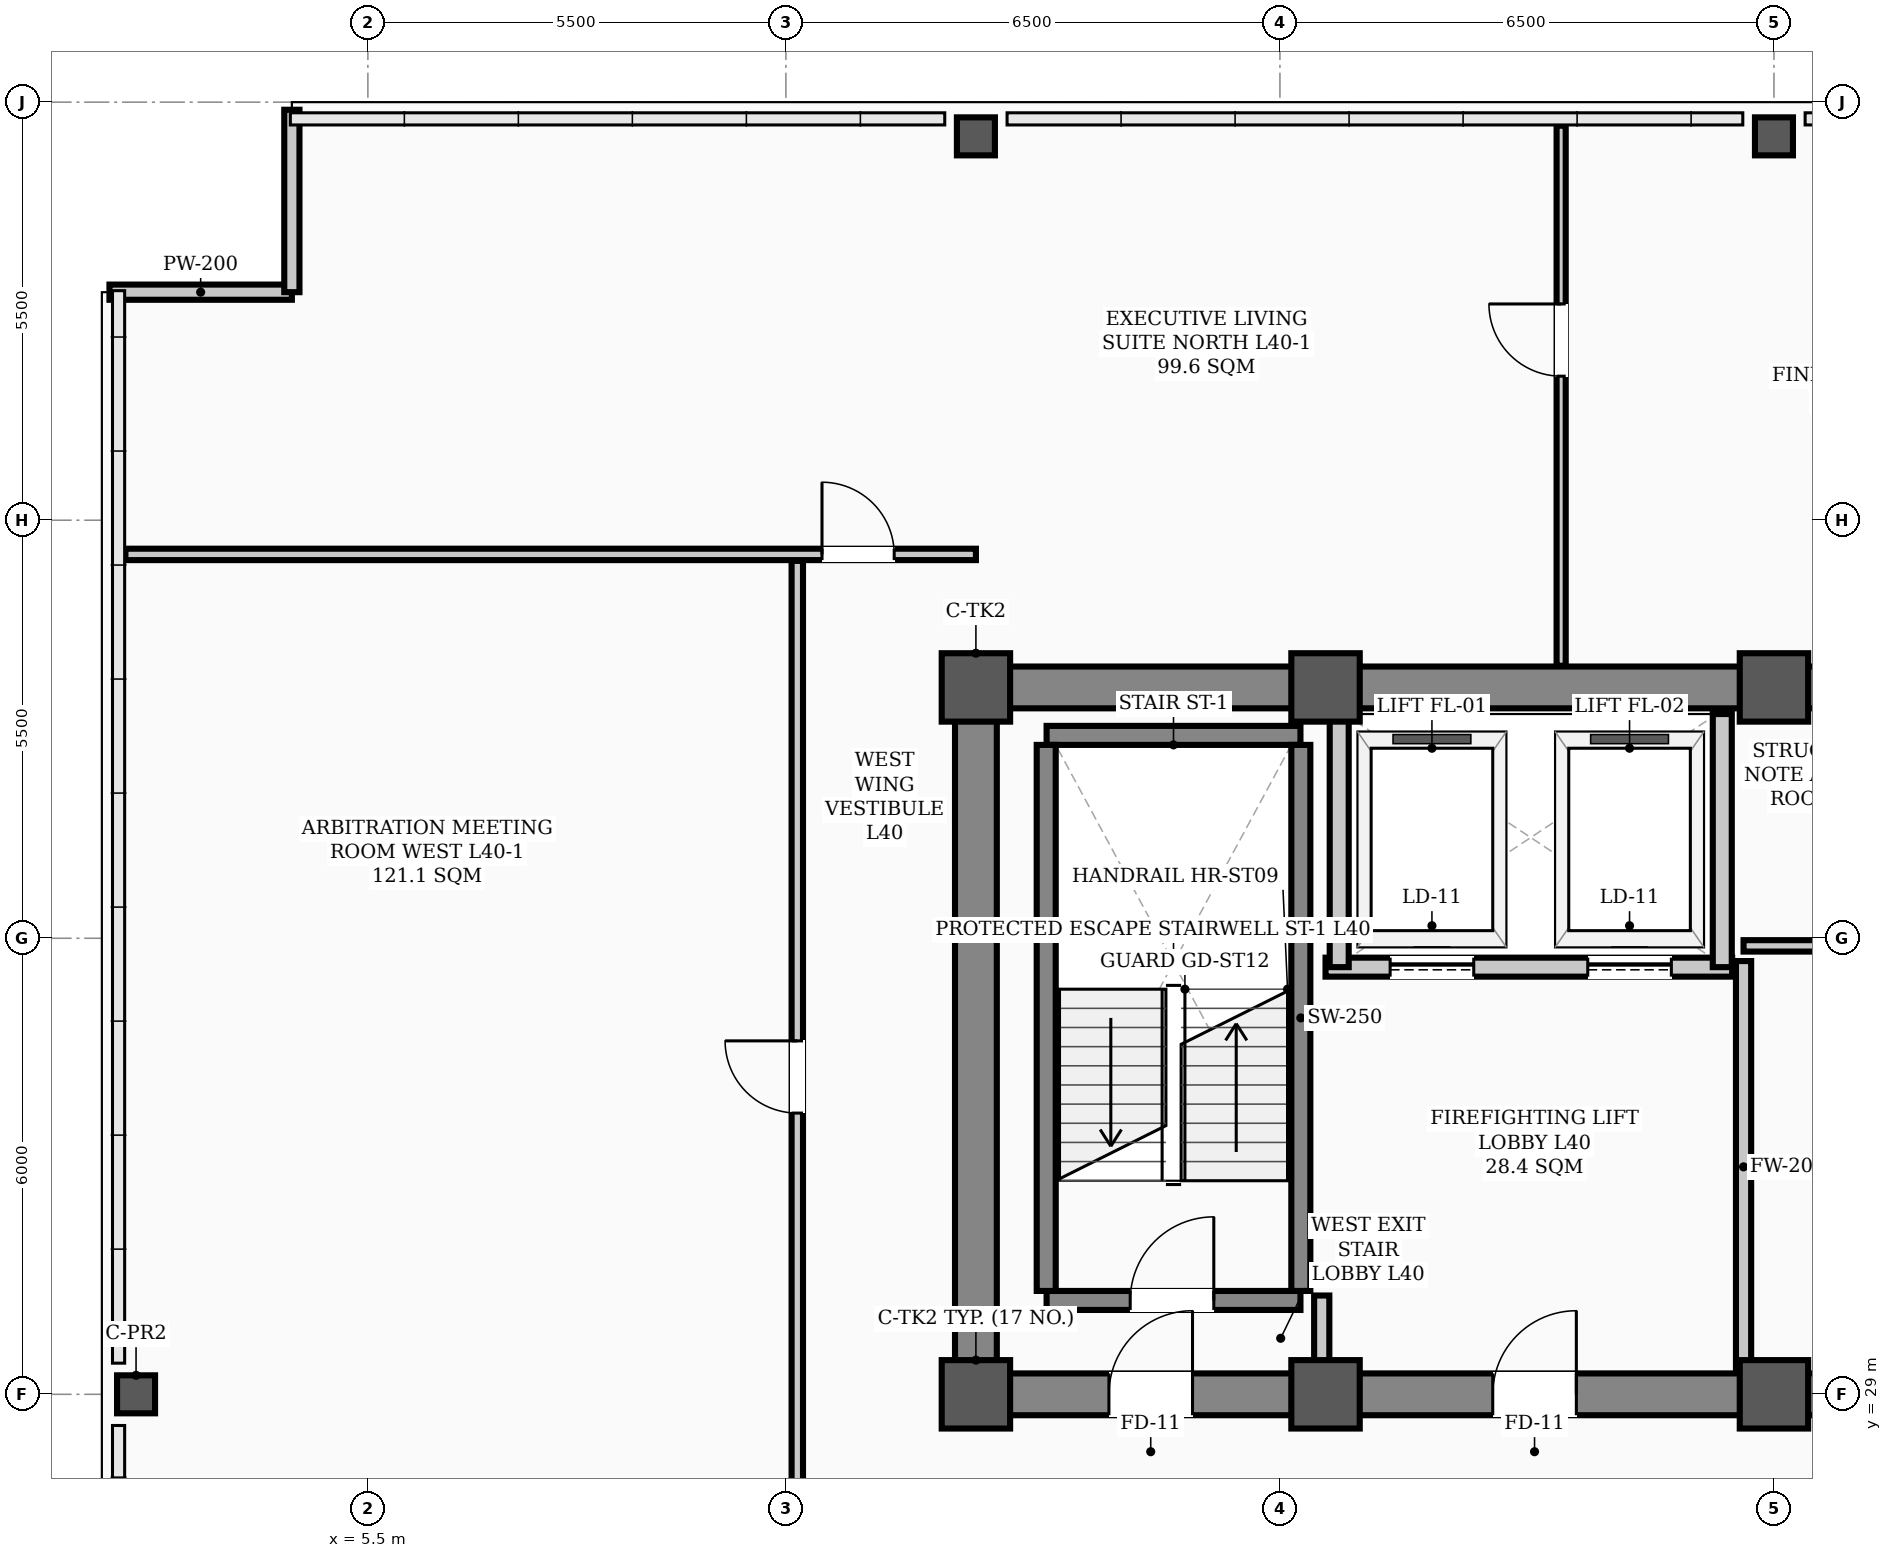
"""IFC4 building model, lengths in metres.
Left out: names, types, materials, properties, quantities, classifications, styles, units other than length and angle.
Written with IfcOpenShell. Run it as: python <this file> out.ifc"""

import sys

from ifc_helpers import new_model, si_unit, direction, frame, frame_2d, origin, origin_2d, place, context, subcontext, project, spatial, rectangle, hollow_rectangle, extrude, element, fill, save


model = new_model("IFC4")
c1 = context("Model", 3, precision=1e-05, world=origin(), true_north=direction((0.0, 1.0)))
c2 = subcontext(c1, "Body", "Model", "MODEL_VIEW")
j1 = project(units=[si_unit("LENGTHUNIT", "METRE"), si_unit("PLANEANGLEUNIT", "RADIAN")], contexts=[c1])
p1 = place(None, origin())
s1 = spatial("IfcSite", under=j1, at=p1, CompositionType="ELEMENT")
p2 = place(p1, origin())
s2 = spatial("IfcBuilding", under=s1, at=p2, CompositionType="ELEMENT")
p3 = place(p2, frame((0.0, 0.0, 161.7)))
s3 = spatial("IfcBuildingStorey", under=s2, at=p3, CompositionType="ELEMENT", Elevation=161.7)
for number, where, z_axis, x_axis in (
    (1, (13.5, 29.0, 0.0), (0.0, 0.0, 1.0), (1.0, 0.0, 0.0)),
    (2, (13.5, 38.3, 0.0), (0.0, 0.0, 1.0), (1.0, 0.0, 0.0)),
    (3, (18.1, 29.0, 0.0), (0.0, 0.0, 1.0), (1.0, 0.0, 0.0)),
    (4, (18.1, 38.3, 0.0), (0.0, 0.0, 1.0), (1.0, 0.0, 0.0)),
    (5, (24.0, 29.0, 0.0), (0.0, 0.0, 1.0), (1.0, 0.0, 0.0)),
    (6, (24.0, 38.3, 0.0), (0.0, 0.0, 1.0), (1.0, 0.0, 0.0)),
):
    element("IfcColumn", number, at=place(p3, frame(where, z_axis=z_axis, x_axis=x_axis)), inside=s3, PredefinedType="COLUMN", context=c2, shape_type="SweptSolid", body=[
        extrude(hollow_rectangle(XDim=0.9, YDim=0.9, WallThickness=0.035, InnerFilletRadius=0.017, OuterFilletRadius=0.052, at=origin_2d()), origin(), (0.0, 0.0, 1.0), 3.9),
    ])
for number, where, z_axis, x_axis in (
    (7, (2.45, 29.0, 0.0), (0.0, 0.0, 1.0), (1.0, 0.0, 0.0)),
    (8, (13.5, 45.55, 0.0), (0.0, 0.0, 1.0), (1.0, 0.0, 0.0)),
    (9, (24.0, 45.55, 0.0), (0.0, 0.0, 1.0), (1.0, 0.0, 0.0)),
):
    element("IfcColumn", number, at=place(p3, frame(where, z_axis=z_axis, x_axis=x_axis)), inside=s3, PredefinedType="COLUMN", context=c2, shape_type="SweptSolid", body=[
        extrude(hollow_rectangle(XDim=0.5, YDim=0.5, WallThickness=0.024, InnerFilletRadius=0.012, OuterFilletRadius=0.036, at=origin_2d()), origin(), (0.0, 0.0, 1.0), 3.9),
    ])
for number, where, z_axis, x_axis in (
    (10, (2.1, 43.5, 0.0), (0.0, 0.0, 1.0), (1.0, 0.0, 0.0)),
    (11, (4.5, 43.5, 0.0), (0.0, 0.0, 1.0), (0.0, 1.0, 0.0)),
):
    element("IfcWall", number, at=place(p3, frame(where, z_axis=z_axis, x_axis=x_axis)), inside=s3, PredefinedType="PARAPET", context=c2, shape_type="SweptSolid", body=[
        extrude(rectangle(XDim=2.4, YDim=0.2, at=frame_2d((1.2, 0.0))), origin(), (0.0, 0.0, 1.0), 1.2),
    ])
p4 = place(p3, frame((13.5, 29.0, 0.0), z_axis=(0.0, 0.0, 1.0), x_axis=(1.0, 0.0, 0.0)))
e12 = element("IfcWall", 12, at=p4, inside=s3, PredefinedType="SHEAR", context=c2, shape_type="SweptSolid", body=[
    extrude(rectangle(XDim=30.5, YDim=0.55, at=frame_2d((15.25, 0.0))), origin(), (0.0, 0.0, 1.0), 3.72),
])
p5 = place(p4, frame((1.75, 0.0, 0.0)))
e13 = element("IfcOpeningElement", 13, at=p5, cuts=e12, PredefinedType="OPENING", context=c2, shape_type="SweptSolid", body=[
    extrude(rectangle(XDim=1.1, YDim=2.08, at=frame_2d((0.55, 1.04))), frame((0.0, 0.285, 0.0), z_axis=(0.0, -1.0, 0.0), x_axis=(1.0, 0.0, 0.0)), (0.0, 0.0, 1.0), 0.57),
])
p6 = place(p4, frame((26.7, 0.0, 0.0)))
e14 = element("IfcOpeningElement", 14, at=p6, cuts=e12, PredefinedType="OPENING", context=c2, shape_type="SweptSolid", body=[
    extrude(rectangle(XDim=1.1, YDim=2.08, at=frame_2d((0.55, 1.04))), frame((0.0, 0.285, 0.0), z_axis=(0.0, -1.0, 0.0), x_axis=(1.0, 0.0, 0.0)), (0.0, 0.0, 1.0), 0.57),
])
p7 = place(p4, frame((6.8, 0.0, 0.0)))
e15 = element("IfcOpeningElement", 15, at=p7, cuts=e12, PredefinedType="OPENING", context=c2, shape_type="SweptSolid", body=[
    extrude(rectangle(XDim=1.1, YDim=2.08, at=frame_2d((0.55, 1.04))), frame((0.0, 0.285, 0.0), z_axis=(0.0, -1.0, 0.0), x_axis=(1.0, 0.0, 0.0)), (0.0, 0.0, 1.0), 0.57),
])
p8 = place(p4, frame((13.2, 0.0, 0.0)))
e16 = element("IfcOpeningElement", 16, at=p8, cuts=e12, PredefinedType="OPENING", context=c2, shape_type="SweptSolid", body=[
    extrude(rectangle(XDim=1.6, YDim=2.08, at=frame_2d((0.8, 1.04))), frame((0.0, 0.285, 0.0), z_axis=(0.0, -1.0, 0.0), x_axis=(1.0, 0.0, 0.0)), (0.0, 0.0, 1.0), 0.57),
])
p9 = place(p4, frame((19.53, 0.0, 0.0)))
e17 = element("IfcOpeningElement", 17, at=p9, cuts=e12, PredefinedType="OPENING", context=c2, shape_type="SweptSolid", body=[
    extrude(rectangle(XDim=0.9, YDim=2.08, at=frame_2d((0.45, 1.04))), frame((0.0, 0.285, 0.0), z_axis=(0.0, -1.0, 0.0), x_axis=(1.0, 0.0, 0.0)), (0.0, 0.0, 1.0), 0.57),
])
p10 = place(p4, frame((21.57, 0.0, 0.0)))
e18 = element("IfcOpeningElement", 18, at=p10, cuts=e12, PredefinedType="OPENING", context=c2, shape_type="SweptSolid", body=[
    extrude(rectangle(XDim=0.9, YDim=2.08, at=frame_2d((0.45, 1.04))), frame((0.0, 0.285, 0.0), z_axis=(0.0, -1.0, 0.0), x_axis=(1.0, 0.0, 0.0)), (0.0, 0.0, 1.0), 0.57),
])
p11 = place(p3, frame((13.5, 38.3, 0.0), z_axis=(0.0, 0.0, 1.0), x_axis=(1.0, 0.0, 0.0)))
e19 = element("IfcWall", 19, at=p11, inside=s3, PredefinedType="SHEAR", context=c2, shape_type="SweptSolid", body=[
    extrude(rectangle(XDim=30.5, YDim=0.55, at=frame_2d((15.25, 0.0))), origin(), (0.0, 0.0, 1.0), 3.72),
])
p12 = place(p3, frame((13.5, 29.35, 0.0), z_axis=(0.0, 0.0, 1.0), x_axis=(0.0, 1.0, 0.0)))
e20 = element("IfcWall", 20, at=p12, inside=s3, PredefinedType="SHEAR", context=c2, shape_type="SweptSolid", body=[
    extrude(rectangle(XDim=8.6, YDim=0.55, at=frame_2d((4.3, 0.0))), origin(), (0.0, 0.0, 1.0), 3.72),
])
p13 = place(p3, frame((14.43, 30.235, 0.0), z_axis=(0.0, 0.0, 1.0), x_axis=(1.0, 0.0, 0.0)))
e21 = element("IfcWall", 21, at=p13, inside=s3, PredefinedType="STANDARD", context=c2, shape_type="SweptSolid", body=[
    extrude(rectangle(XDim=3.34, YDim=0.25, at=frame_2d((1.67, 0.0))), origin(), (0.0, 0.0, 1.0), 3.72),
])
p14 = place(p13, frame((1.1, 0.0, 0.0)))
e22 = element("IfcOpeningElement", 22, at=p14, cuts=e21, PredefinedType="OPENING", context=c2, shape_type="SweptSolid", body=[
    extrude(rectangle(XDim=1.1, YDim=2.08, at=frame_2d((0.55, 1.04))), frame((0.0, 0.135, 0.0), z_axis=(0.0, -1.0, 0.0), x_axis=(1.0, 0.0, 0.0)), (0.0, 0.0, 1.0), 0.27),
])
p15 = place(p3, frame((14.43, 37.669, 0.0), z_axis=(0.0, 0.0, 1.0), x_axis=(1.0, 0.0, 0.0)))
e23 = element("IfcWall", 23, at=p15, inside=s3, PredefinedType="STANDARD", context=c2, shape_type="SweptSolid", body=[
    extrude(rectangle(XDim=3.34, YDim=0.25, at=frame_2d((1.67, 0.0))), origin(), (0.0, 0.0, 1.0), 3.72),
])
for number, where, z_axis, x_axis in (
    (24, (14.425, 30.36, 0.0), (0.0, 0.0, 1.0), (0.0, 1.0, 0.0)),
    (25, (17.775, 30.36, 0.0), (0.0, 0.0, 1.0), (0.0, 1.0, 0.0)),
):
    element("IfcWall", number, at=place(p3, frame(where, z_axis=z_axis, x_axis=x_axis)), inside=s3, PredefinedType="STANDARD", context=c2, shape_type="SweptSolid", body=[
        extrude(rectangle(XDim=7.184, YDim=0.25, at=frame_2d((3.592, 0.0))), origin(), (0.0, 0.0, 1.0), 3.72),
    ])
p16 = place(p3, frame((18.1, 34.62, 0.0), z_axis=(0.0, 0.0, 1.0), x_axis=(1.0, 0.0, 0.0)))
e26 = element("IfcWall", 26, at=p16, inside=s3, PredefinedType="STANDARD", context=c2, shape_type="SweptSolid", body=[
    extrude(rectangle(XDim=5.35, YDim=0.25, at=frame_2d((2.675, 0.0))), origin(), (0.0, 0.0, 1.0), 3.72),
])
p17 = place(p16, frame((0.85, 0.0, 0.0)))
e27 = element("IfcOpeningElement", 27, at=p17, cuts=e26, PredefinedType="OPENING", context=c2, shape_type="SweptSolid", body=[
    extrude(rectangle(XDim=1.1, YDim=2.08, at=frame_2d((0.55, 1.04))), frame((0.0, 0.135, 0.0), z_axis=(0.0, -1.0, 0.0), x_axis=(1.0, 0.0, 0.0)), (0.0, 0.0, 1.0), 0.27),
])
p18 = place(p16, frame((3.45, 0.0, 0.0)))
e28 = element("IfcOpeningElement", 28, at=p18, cuts=e26, PredefinedType="OPENING", context=c2, shape_type="SweptSolid", body=[
    extrude(rectangle(XDim=1.1, YDim=2.08, at=frame_2d((0.55, 1.04))), frame((0.0, 0.135, 0.0), z_axis=(0.0, -1.0, 0.0), x_axis=(1.0, 0.0, 0.0)), (0.0, 0.0, 1.0), 0.27),
])
for number, where, z_axis, x_axis in (
    (29, (18.28, 34.62, 0.0), (0.0, 0.0, 1.0), (0.0, 1.0, 0.0)),
    (30, (23.32, 34.62, 0.0), (0.0, 0.0, 1.0), (0.0, 1.0, 0.0)),
):
    element("IfcWall", number, at=place(p3, frame(where, z_axis=z_axis, x_axis=x_axis)), inside=s3, PredefinedType="STANDARD", context=c2, shape_type="SweptSolid", body=[
        extrude(rectangle(XDim=3.33, YDim=0.25, at=frame_2d((1.665, 0.0))), origin(), (0.0, 0.0, 1.0), 3.35),
    ])
p19 = place(p3, frame((23.6, 34.9, 0.0), z_axis=(0.0, 0.0, 1.0), x_axis=(1.0, 0.0, 0.0)))
e31 = element("IfcWall", 31, at=p19, inside=s3, PredefinedType="PARTITIONING", context=c2, shape_type="SweptSolid", body=[
    extrude(rectangle(XDim=4.58, YDim=0.15, at=frame_2d((2.29, 0.0))), origin(), (0.0, 0.0, 1.0), 3.72),
])
p20 = place(p19, frame((1.875, 0.0, 0.0)))
e32 = element("IfcOpeningElement", 32, at=p20, cuts=e31, PredefinedType="OPENING", context=c2, shape_type="SweptSolid", body=[
    extrude(rectangle(XDim=0.95, YDim=2.08, at=frame_2d((0.475, 1.04))), frame((0.0, 0.085, 0.0), z_axis=(0.0, -1.0, 0.0), x_axis=(1.0, 0.0, 0.0)), (0.0, 0.0, 1.0), 0.17),
])
p21 = place(p3, frame((2.31, 40.05, 0.0), z_axis=(0.0, 0.0, 1.0), x_axis=(1.0, 0.0, 0.0)))
e33 = element("IfcWall", 33, at=p21, inside=s3, PredefinedType="PARTITIONING", context=c2, shape_type="SweptSolid", body=[
    extrude(rectangle(XDim=11.19, YDim=0.15, at=frame_2d((5.595, 0.0))), origin(), (0.0, 0.0, 1.0), 3.2),
])
p22 = place(p21, frame((9.165, 0.0, 0.0)))
e34 = element("IfcOpeningElement", 34, at=p22, cuts=e33, PredefinedType="OPENING", context=c2, shape_type="SweptSolid", body=[
    extrude(rectangle(XDim=0.95, YDim=2.08, at=frame_2d((0.475, 1.04))), frame((0.0, 0.085, 0.0), z_axis=(0.0, -1.0, 0.0), x_axis=(1.0, 0.0, 0.0)), (0.0, 0.0, 1.0), 0.17),
])
p23 = place(p3, frame((18.05, 29.285, 0.0), z_axis=(0.0, 0.0, 1.0), x_axis=(0.0, 1.0, 0.0)))
e35 = element("IfcWall", 35, at=p23, inside=s3, PredefinedType="STANDARD", context=c2, shape_type="SweptSolid", body=[
    extrude(rectangle(XDim=1.015, YDim=0.2, at=frame_2d((0.508, 0.0))), origin(), (0.0, 0.0, 1.0), 3.35),
])
p24 = place(p3, frame((23.6, 29.285, 0.0), z_axis=(0.0, 0.0, 1.0), x_axis=(0.0, 1.0, 0.0)))
e36 = element("IfcWall", 36, at=p24, inside=s3, PredefinedType="STANDARD", context=c2, shape_type="SweptSolid", body=[
    extrude(rectangle(XDim=5.415, YDim=0.2, at=frame_2d((2.708, 0.0))), origin(), (0.0, 0.0, 1.0), 3.2),
])
p25 = place(p3, frame((11.15, 26.385, 0.0), z_axis=(0.0, 0.0, 1.0), x_axis=(0.0, 1.0, 0.0)))
e37 = element("IfcWall", 37, at=p25, inside=s3, PredefinedType="PARTITIONING", context=c2, shape_type="SweptSolid", body=[
    extrude(rectangle(XDim=13.58, YDim=0.15, at=frame_2d((6.79, 0.0))), origin(), (0.0, 0.0, 1.0), 3.1),
])
p26 = place(p25, frame((6.315, 0.0, 0.0)))
e38 = element("IfcOpeningElement", 38, at=p26, cuts=e37, PredefinedType="OPENING", context=c2, shape_type="SweptSolid", body=[
    extrude(rectangle(XDim=0.95, YDim=2.08, at=frame_2d((0.475, 1.04))), frame((0.0, 0.085, 0.0), z_axis=(0.0, -1.0, 0.0), x_axis=(1.0, 0.0, 0.0)), (0.0, 0.0, 1.0), 0.17),
])
p27 = place(p3, frame((21.2, 38.585, 0.0), z_axis=(0.0, 0.0, 1.0), x_axis=(0.0, 1.0, 0.0)))
e39 = element("IfcWall", 39, at=p27, inside=s3, PredefinedType="PARTITIONING", context=c2, shape_type="SweptSolid", body=[
    extrude(rectangle(XDim=7.105, YDim=0.12, at=frame_2d((3.552, 0.0))), origin(), (0.0, 0.0, 1.0), 3.212),
])
p28 = place(p27, frame((3.81, 0.0, 0.0)))
e40 = element("IfcOpeningElement", 40, at=p28, cuts=e39, PredefinedType="OPENING", context=c2, shape_type="SweptSolid", body=[
    extrude(rectangle(XDim=0.95, YDim=2.08, at=frame_2d((0.475, 1.04))), frame((0.0, 0.07, 0.0), z_axis=(0.0, -1.0, 0.0), x_axis=(1.0, 0.0, 0.0)), (0.0, 0.0, 1.0), 0.14),
])
p29 = place(p14, origin())
e41 = element("IfcDoor", 41, at=p29, inside=s3, OperationType="SINGLE_SWING_RIGHT", PredefinedType="DOOR", context=c2, shape_type="SweptSolid", body=[
    extrude(rectangle(XDim=1.1, YDim=2.08, at=frame_2d((0.55, 1.04))), frame((0.0, 0.025, 0.0), z_axis=(0.0, -1.0, 0.0), x_axis=(1.0, 0.0, 0.0)), (0.0, 0.0, 1.0), 0.05),
])
fill(e22, e41)
p30 = place(p5, origin())
e42 = element("IfcDoor", 42, at=p30, inside=s3, OperationType="SINGLE_SWING_RIGHT", PredefinedType="DOOR", context=c2, shape_type="SweptSolid", body=[
    extrude(rectangle(XDim=1.1, YDim=2.08, at=frame_2d((0.55, 1.04))), frame((0.0, 0.025, 0.0), z_axis=(0.0, -1.0, 0.0), x_axis=(1.0, 0.0, 0.0)), (0.0, 0.0, 1.0), 0.05),
])
fill(e13, e42)
p31 = place(p7, origin())
e43 = element("IfcDoor", 43, at=p31, inside=s3, OperationType="SINGLE_SWING_RIGHT", PredefinedType="DOOR", context=c2, shape_type="SweptSolid", body=[
    extrude(rectangle(XDim=1.1, YDim=2.08, at=frame_2d((0.55, 1.04))), frame((0.0, 0.025, 0.0), z_axis=(0.0, -1.0, 0.0), x_axis=(1.0, 0.0, 0.0)), (0.0, 0.0, 1.0), 0.05),
])
fill(e15, e43)
p32 = place(p26, origin())
e44 = element("IfcDoor", 44, at=p32, inside=s3, OperationType="SINGLE_SWING_RIGHT", PredefinedType="DOOR", context=c2, shape_type="SweptSolid", body=[
    extrude(rectangle(XDim=0.95, YDim=2.08, at=frame_2d((0.475, 1.04))), frame((0.0, 0.025, 0.0), z_axis=(0.0, -1.0, 0.0), x_axis=(1.0, 0.0, 0.0)), (0.0, 0.0, 1.0), 0.05),
])
fill(e38, e44)
p33 = place(p22, origin())
e45 = element("IfcDoor", 45, at=p33, inside=s3, OperationType="SINGLE_SWING_LEFT", PredefinedType="DOOR", context=c2, shape_type="SweptSolid", body=[
    extrude(rectangle(XDim=0.95, YDim=2.08, at=frame_2d((0.475, 1.04))), frame((0.0, 0.025, 0.0), z_axis=(0.0, -1.0, 0.0), x_axis=(1.0, 0.0, 0.0)), (0.0, 0.0, 1.0), 0.05),
])
fill(e34, e45)
p34 = place(p28, origin())
e46 = element("IfcDoor", 46, at=p34, inside=s3, OperationType="SINGLE_SWING_RIGHT", PredefinedType="DOOR", context=c2, shape_type="SweptSolid", body=[
    extrude(rectangle(XDim=0.95, YDim=2.08, at=frame_2d((0.475, 1.04))), frame((0.0, 0.025, 0.0), z_axis=(0.0, -1.0, 0.0), x_axis=(1.0, 0.0, 0.0)), (0.0, 0.0, 1.0), 0.05),
])
fill(e40, e46)
p35 = place(p17, origin())
e47 = element("IfcDoor", 47, at=p35, inside=s3, OperationType="SLIDING_TO_LEFT", PredefinedType="DOOR", context=c2, shape_type="SweptSolid", body=[
    extrude(rectangle(XDim=1.1, YDim=2.08, at=frame_2d((0.55, 1.04))), frame((0.0, 0.025, 0.0), z_axis=(0.0, -1.0, 0.0), x_axis=(1.0, 0.0, 0.0)), (0.0, 0.0, 1.0), 0.05),
])
fill(e27, e47)
p36 = place(p18, origin())
e48 = element("IfcDoor", 48, at=p36, inside=s3, OperationType="SLIDING_TO_LEFT", PredefinedType="DOOR", context=c2, shape_type="SweptSolid", body=[
    extrude(rectangle(XDim=1.1, YDim=2.08, at=frame_2d((0.55, 1.04))), frame((0.0, 0.025, 0.0), z_axis=(0.0, -1.0, 0.0), x_axis=(1.0, 0.0, 0.0)), (0.0, 0.0, 1.0), 0.05),
])
fill(e28, e48)
save(model, sys.argv[1])
